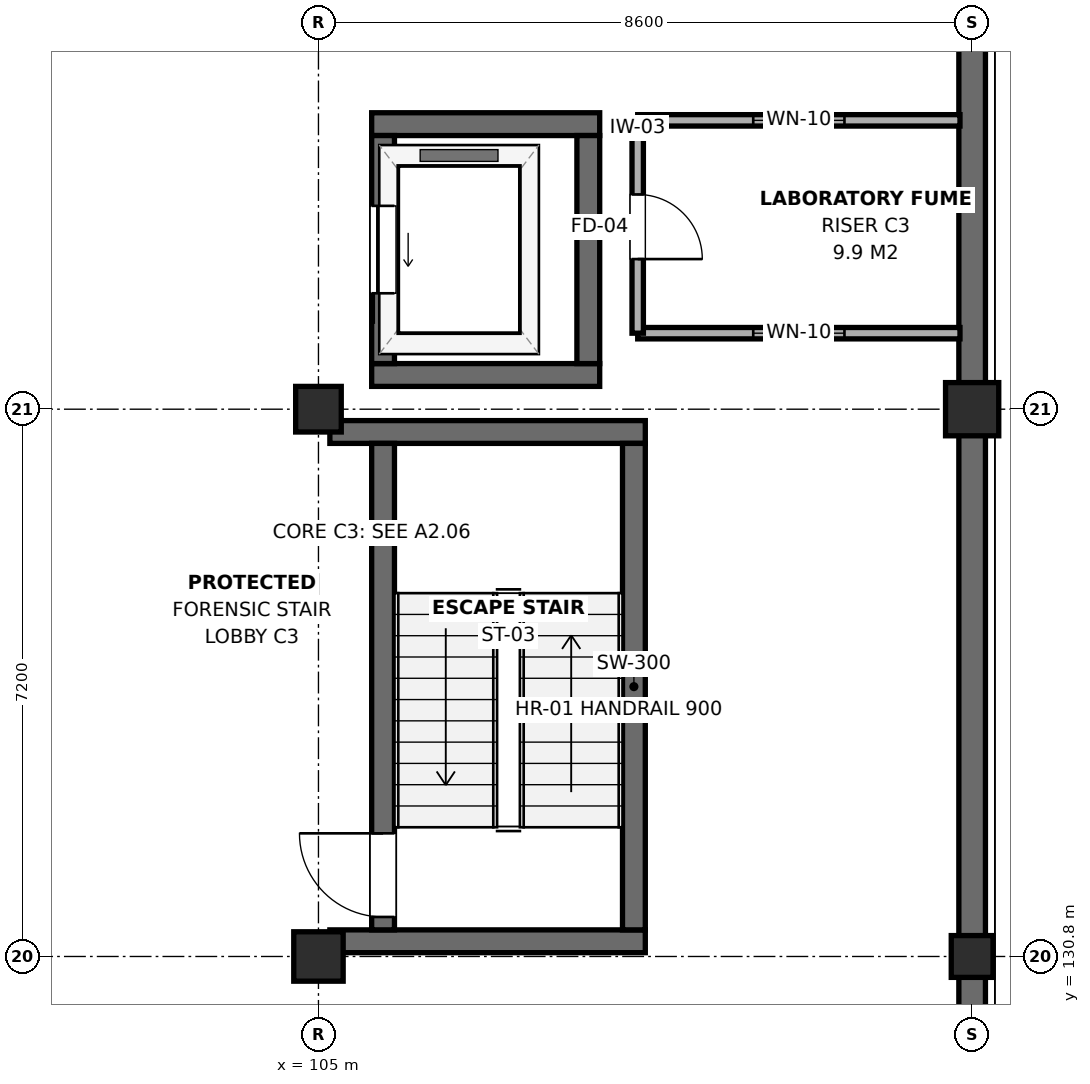
"""IFC4 building model, lengths in metres.
Left out: names, types, materials, properties, quantities, classifications, styles, units other than length and angle.
Written with IfcOpenShell. Run it as: python <this file> out.ifc"""

import sys

from ifc_helpers import new_model, si_unit, direction, frame, frame_2d, origin, origin_2d, place, context, subcontext, project, spatial, rectangle, extrude, element, fill, save


model = new_model("IFC4")
c1 = context("Model", 3, precision=1e-05, world=origin(), true_north=direction((0.0, 1.0)))
c2 = subcontext(c1, "Body", "Model", "MODEL_VIEW")
j1 = project(units=[si_unit("LENGTHUNIT", "METRE"), si_unit("PLANEANGLEUNIT", "RADIAN")], contexts=[c1])
p1 = place(None, origin())
s1 = spatial("IfcSite", under=j1, at=p1, CompositionType="ELEMENT")
p2 = place(p1, origin())
s2 = spatial("IfcBuilding", under=s1, at=p2, CompositionType="ELEMENT")
p3 = place(p2, frame((0.0, 0.0, -4.2)))
s3 = spatial("IfcBuildingStorey", under=s2, at=p3, CompositionType="ELEMENT", Elevation=-4.2)
p4 = place(p3, frame((105.0, 130.8, 0.0), z_axis=(0.0, 0.0, 1.0), x_axis=(1.0, 0.0, 0.0)))
e1 = element("IfcColumn", 1, at=p4, inside=s3, PredefinedType="COLUMN", context=c2, shape_type="SweptSolid", body=[
    extrude(rectangle(XDim=0.65, YDim=0.65, at=origin_2d()), origin(), (0.0, 0.0, 1.0), 4.2),
])
p5 = place(p3, frame((105.0, 138.0, 0.0), z_axis=(0.0, 0.0, 1.0), x_axis=(1.0, 0.0, 0.0)))
e2 = element("IfcColumn", 2, at=p5, inside=s3, PredefinedType="COLUMN", context=c2, shape_type="SweptSolid", body=[
    extrude(rectangle(XDim=0.6, YDim=0.6, at=origin_2d()), origin(), (0.0, 0.0, 1.0), 4.2),
])
p6 = place(p3, frame((113.6, 130.8, 0.0), z_axis=(0.0, 0.0, 1.0), x_axis=(1.0, 0.0, 0.0)))
e3 = element("IfcColumn", 3, at=p6, inside=s3, PredefinedType="COLUMN", context=c2, shape_type="SweptSolid", body=[
    extrude(rectangle(XDim=0.55, YDim=0.55, at=origin_2d()), origin(), (0.0, 0.0, 1.0), 4.2),
])
p7 = place(p3, frame((113.6, 138.0, 0.0), z_axis=(0.0, 0.0, 1.0), x_axis=(1.0, 0.0, 0.0)))
e4 = element("IfcColumn", 4, at=p7, inside=s3, PredefinedType="COLUMN", context=c2, shape_type="SweptSolid", body=[
    extrude(rectangle(XDim=0.7, YDim=0.7, at=origin_2d()), origin(), (0.0, 0.0, 1.0), 4.2),
])
p8 = place(p3, frame((113.6, 96.175, 0.0), z_axis=(0.0, 0.0, 1.0), x_axis=(0.0, 1.0, 0.0)))
e5 = element("IfcWall", 5, at=p8, inside=s3, PredefinedType="USERDEFINED", context=c2, shape_type="SweptSolid", body=[
    extrude(rectangle(XDim=70.05, YDim=0.35, at=frame_2d((35.025, 0.0))), origin(), (0.0, 0.0, 1.0), 3.92),
])
for number, where, z_axis, x_axis in (
    (6, (105.15, 131.0, 0.0), (0.0, 0.0, 1.0), (1.0, 0.0, 0.0)),
    (7, (105.15, 137.7, 0.0), (0.0, 0.0, 1.0), (1.0, 0.0, 0.0)),
):
    element("IfcWall", number, at=place(p3, frame(where, z_axis=z_axis, x_axis=x_axis)), inside=s3, PredefinedType="SHEAR", context=c2, shape_type="SweptSolid", body=[
        extrude(rectangle(XDim=4.15, YDim=0.3, at=frame_2d((2.075, 0.0))), origin(), (0.0, 0.0, 1.0), 3.92),
    ])
p9 = place(p3, frame((105.85, 131.15, 0.0), z_axis=(0.0, 0.0, 1.0), x_axis=(0.0, 1.0, 0.0)))
e8 = element("IfcWall", 8, at=p9, inside=s3, PredefinedType="SHEAR", context=c2, shape_type="SweptSolid", body=[
    extrude(rectangle(XDim=6.4, YDim=0.3, at=frame_2d((3.2, 0.0))), origin(), (0.0, 0.0, 1.0), 3.92),
])
p10 = place(p9, frame((0.17, 0.0, 0.0)))
e9 = element("IfcOpeningElement", 9, at=p10, cuts=e8, PredefinedType="OPENING", context=c2, shape_type="SweptSolid", body=[
    extrude(rectangle(XDim=1.1, YDim=2.15, at=frame_2d((0.55, 1.075))), frame((0.0, 0.165, 0.0), z_axis=(0.0, -1.0, 0.0), x_axis=(1.0, 0.0, 0.0)), (0.0, 0.0, 1.0), 0.33),
])
p11 = place(p3, frame((109.15, 131.15, 0.0), z_axis=(0.0, 0.0, 1.0), x_axis=(0.0, 1.0, 0.0)))
e10 = element("IfcWall", 10, at=p11, inside=s3, PredefinedType="SHEAR", context=c2, shape_type="SweptSolid", body=[
    extrude(rectangle(XDim=6.4, YDim=0.3, at=frame_2d((3.2, 0.0))), origin(), (0.0, 0.0, 1.0), 3.92),
])
for number, where, z_axis, x_axis in (
    (11, (105.7, 138.45, 0.0), (0.0, 0.0, 1.0), (1.0, 0.0, 0.0)),
    (12, (105.7, 141.75, 0.0), (0.0, 0.0, 1.0), (1.0, 0.0, 0.0)),
):
    element("IfcWall", number, at=place(p3, frame(where, z_axis=z_axis, x_axis=x_axis)), inside=s3, PredefinedType="SHEAR", context=c2, shape_type="SweptSolid", body=[
        extrude(rectangle(XDim=3.0, YDim=0.3, at=frame_2d((1.5, 0.0))), origin(), (0.0, 0.0, 1.0), 3.92),
    ])
p12 = place(p3, frame((105.85, 138.6, 0.0), z_axis=(0.0, 0.0, 1.0), x_axis=(0.0, 1.0, 0.0)))
e13 = element("IfcWall", 13, at=p12, inside=s3, PredefinedType="SHEAR", context=c2, shape_type="SweptSolid", body=[
    extrude(rectangle(XDim=3.0, YDim=0.3, at=frame_2d((1.5, 0.0))), origin(), (0.0, 0.0, 1.0), 3.92),
])
p13 = place(p12, frame((0.925, 0.0, 0.0)))
e14 = element("IfcOpeningElement", 14, at=p13, cuts=e13, PredefinedType="OPENING", context=c2, shape_type="SweptSolid", body=[
    extrude(rectangle(XDim=1.15, YDim=2.15, at=frame_2d((0.575, 1.075))), frame((0.0, 0.165, 0.0), z_axis=(0.0, -1.0, 0.0), x_axis=(1.0, 0.0, 0.0)), (0.0, 0.0, 1.0), 0.33),
])
p14 = place(p3, frame((108.55, 138.6, 0.0), z_axis=(0.0, 0.0, 1.0), x_axis=(0.0, 1.0, 0.0)))
e15 = element("IfcWall", 15, at=p14, inside=s3, PredefinedType="SHEAR", context=c2, shape_type="SweptSolid", body=[
    extrude(rectangle(XDim=3.0, YDim=0.3, at=frame_2d((1.5, 0.0))), origin(), (0.0, 0.0, 1.0), 3.92),
])
p15 = place(p3, frame((109.2, 139.0, 0.0), z_axis=(0.0, 0.0, 1.0), x_axis=(1.0, 0.0, 0.0)))
e16 = element("IfcWall", 16, at=p15, inside=s3, PredefinedType="PARTITIONING", context=c2, shape_type="SweptSolid", body=[
    extrude(rectangle(XDim=4.24, YDim=0.15, at=frame_2d((2.12, 0.0))), origin(), (0.0, 0.0, 1.0), 3.415),
])
p16 = place(p15, frame((1.52, 0.0, 0.95)))
e17 = element("IfcOpeningElement", 17, at=p16, cuts=e16, PredefinedType="OPENING", context=c2, shape_type="SweptSolid", body=[
    extrude(rectangle(XDim=1.2, YDim=1.5, at=frame_2d((0.6, 0.75))), frame((0.0, 0.09, 0.0), z_axis=(0.0, -1.0, 0.0), x_axis=(1.0, 0.0, 0.0)), (0.0, 0.0, 1.0), 0.18),
])
p17 = place(p3, frame((109.2, 141.8, 0.0), z_axis=(0.0, 0.0, 1.0), x_axis=(1.0, 0.0, 0.0)))
e18 = element("IfcWall", 18, at=p17, inside=s3, PredefinedType="PARTITIONING", context=c2, shape_type="SweptSolid", body=[
    extrude(rectangle(XDim=4.24, YDim=0.15, at=frame_2d((2.12, 0.0))), origin(), (0.0, 0.0, 1.0), 3.415),
])
p18 = place(p17, frame((1.52, 0.0, 0.95)))
e19 = element("IfcOpeningElement", 19, at=p18, cuts=e18, PredefinedType="OPENING", context=c2, shape_type="SweptSolid", body=[
    extrude(rectangle(XDim=1.2, YDim=1.5, at=frame_2d((0.6, 0.75))), frame((0.0, 0.09, 0.0), z_axis=(0.0, -1.0, 0.0), x_axis=(1.0, 0.0, 0.0)), (0.0, 0.0, 1.0), 0.18),
])
p19 = place(p3, frame((109.2, 139.0, 0.0), z_axis=(0.0, 0.0, 1.0), x_axis=(0.0, 1.0, 0.0)))
e20 = element("IfcWall", 20, at=p19, inside=s3, PredefinedType="PARTITIONING", context=c2, shape_type="SweptSolid", body=[
    extrude(rectangle(XDim=2.8, YDim=0.15, at=frame_2d((1.4, 0.0))), origin(), (0.0, 0.0, 1.0), 3.915),
])
p20 = place(p19, frame((0.975, 0.0, 0.0)))
e21 = element("IfcOpeningElement", 21, at=p20, cuts=e20, PredefinedType="OPENING", context=c2, shape_type="SweptSolid", body=[
    extrude(rectangle(XDim=0.85, YDim=2.1, at=frame_2d((0.425, 1.05))), frame((0.0, 0.09, 0.0), z_axis=(0.0, -1.0, 0.0), x_axis=(1.0, 0.0, 0.0)), (0.0, 0.0, 1.0), 0.18),
])
p21 = place(p10, origin())
e22 = element("IfcDoor", 22, at=p21, inside=s3, OperationType="SINGLE_SWING_RIGHT", PredefinedType="DOOR", context=c2, shape_type="SweptSolid", body=[
    extrude(rectangle(XDim=1.1, YDim=2.15, at=frame_2d((0.55, 1.075))), frame((0.0, 0.025, 0.0), z_axis=(0.0, -1.0, 0.0), x_axis=(1.0, 0.0, 0.0)), (0.0, 0.0, 1.0), 0.05),
])
fill(e9, e22)
p22 = place(p13, origin())
e23 = element("IfcDoor", 23, at=p22, inside=s3, OperationType="SLIDING_TO_LEFT", PredefinedType="DOOR", context=c2, shape_type="SweptSolid", body=[
    extrude(rectangle(XDim=1.15, YDim=2.15, at=frame_2d((0.575, 1.075))), frame((0.0, 0.025, 0.0), z_axis=(0.0, -1.0, 0.0), x_axis=(1.0, 0.0, 0.0)), (0.0, 0.0, 1.0), 0.05),
])
fill(e14, e23)
p23 = place(p16, origin())
e24 = element("IfcWindow", 24, at=p23, inside=s3, PartitioningType="SINGLE_PANEL", PredefinedType="WINDOW", context=c2, shape_type="SweptSolid", body=[
    extrude(rectangle(XDim=1.2, YDim=1.5, at=frame_2d((0.6, 0.75))), frame((0.0, 0.03, 0.0), z_axis=(0.0, -1.0, 0.0), x_axis=(1.0, 0.0, 0.0)), (0.0, 0.0, 1.0), 0.06),
])
fill(e17, e24)
p24 = place(p18, origin())
e25 = element("IfcWindow", 25, at=p24, inside=s3, PartitioningType="SINGLE_PANEL", PredefinedType="WINDOW", context=c2, shape_type="SweptSolid", body=[
    extrude(rectangle(XDim=1.2, YDim=1.5, at=frame_2d((0.6, 0.75))), frame((0.0, 0.03, 0.0), z_axis=(0.0, -1.0, 0.0), x_axis=(1.0, 0.0, 0.0)), (0.0, 0.0, 1.0), 0.06),
])
fill(e19, e25)
p25 = place(p20, frame((0.85, 0.0, 0.0), z_axis=(0.0, 0.0, 1.0), x_axis=(-1.0, 0.0, 0.0)))
e26 = element("IfcDoor", 26, at=p25, inside=s3, OperationType="SINGLE_SWING_RIGHT", PredefinedType="DOOR", context=c2, shape_type="SweptSolid", body=[
    extrude(rectangle(XDim=0.85, YDim=2.1, at=frame_2d((0.425, 1.05))), frame((0.0, 0.025, 0.0), z_axis=(0.0, -1.0, 0.0), x_axis=(1.0, 0.0, 0.0)), (0.0, 0.0, 1.0), 0.05),
])
fill(e21, e26)
save(model, sys.argv[1])
